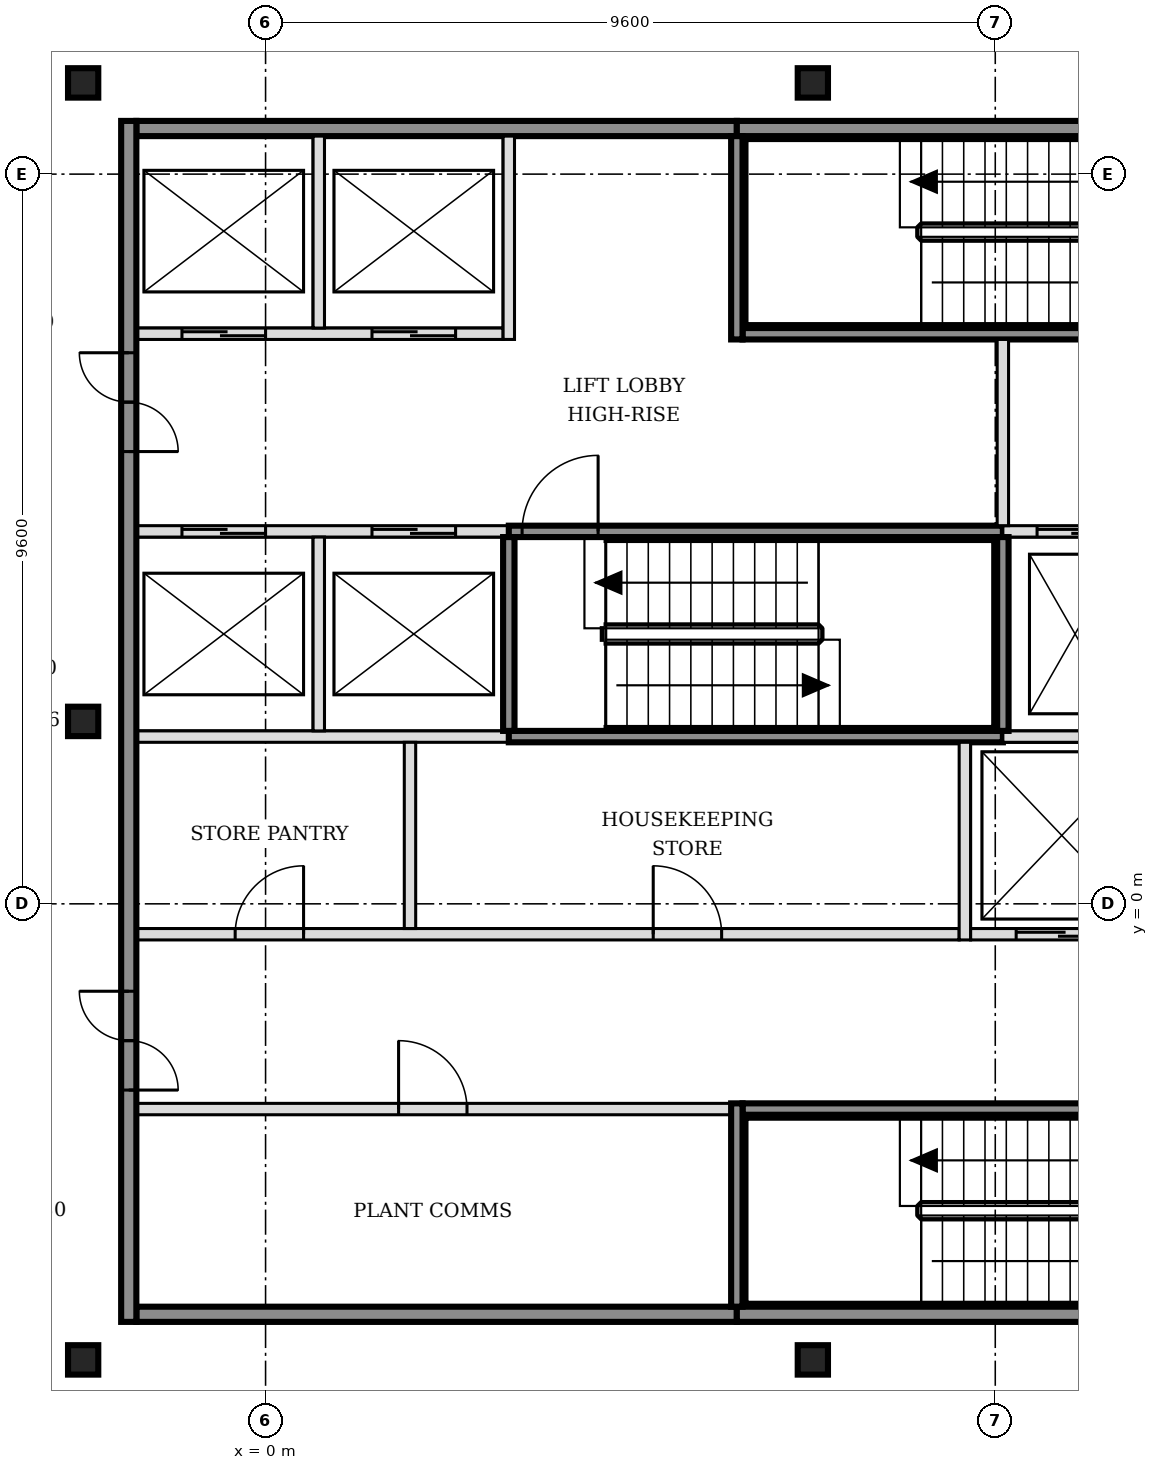
"""IFC4 building model, lengths in metres.
Left out: names, types, materials, properties, quantities, classifications, styles, units other than length and angle.
Written with IfcOpenShell. Run it as: python <this file> out.ifc"""

import sys

from ifc_helpers import new_model, si_unit, direction, frame, frame_2d, origin, origin_2d, place, context, subcontext, project, spatial, rectangle, i_section, extrude, element, fill, save


model = new_model("IFC4")
c1 = context("Model", 3, precision=1e-05, world=origin(), true_north=direction((0.0, 1.0)))
c2 = subcontext(c1, "Body", "Model", "MODEL_VIEW")
j1 = project(units=[si_unit("LENGTHUNIT", "METRE"), si_unit("PLANEANGLEUNIT", "RADIAN")], contexts=[c1])
p1 = place(None, origin())
s1 = spatial("IfcSite", under=j1, at=p1, CompositionType="ELEMENT")
p2 = place(p1, origin())
s2 = spatial("IfcBuilding", under=s1, at=p2, CompositionType="ELEMENT")
p3 = place(p2, frame((0.0, 0.0, 257.4)))
s3 = spatial("IfcBuildingStorey", under=s2, at=p3, CompositionType="ELEMENT", Elevation=257.4)
for number, where, z_axis, x_axis in (
    (1, (-2.4, -6.0, -0.15), (0.0, 0.0, 1.0), (1.0, 0.0, 0.0)),
    (2, (7.2, -6.0, -0.15), (0.0, 0.0, 1.0), (1.0, 0.0, 0.0)),
    (3, (-2.4, 2.4, -0.15), (0.0, 0.0, 1.0), (1.0, 0.0, 0.0)),
    (4, (-2.4, 10.8, -0.15), (0.0, 0.0, 1.0), (1.0, 0.0, 0.0)),
    (5, (7.2, 10.8, -0.15), (0.0, 0.0, 1.0), (1.0, 0.0, 0.0)),
):
    element("IfcColumn", number, at=place(p3, frame(where, z_axis=z_axis, x_axis=x_axis)), inside=s3, PredefinedType="COLUMN", context=c2, shape_type="SweptSolid", body=[
        extrude(i_section(OverallWidth=0.398, OverallDepth=0.387, WebThickness=0.021, FlangeThickness=0.033, FilletRadius=0.015, at=origin_2d()), origin(), (0.0, 0.0, 1.0), 3.5),
    ])
p4 = place(p3, frame((-1.7, -5.4, 0.0), z_axis=(0.0, 0.0, 1.0), x_axis=(1.0, 0.0, 0.0)))
e6 = element("IfcWall", 6, at=p4, inside=s3, PredefinedType="SOLIDWALL", context=c2, shape_type="SweptSolid", body=[
    extrude(rectangle(XDim=7.9, YDim=0.2, at=frame_2d((3.95, 0.0))), origin(), (0.0, 0.0, 1.0), 3.35),
])
p5 = place(p3, frame((6.2, -5.4, 0.0), z_axis=(0.0, 0.0, 1.0), x_axis=(1.0, 0.0, 0.0)))
e7 = element("IfcWall", 7, at=p5, inside=s3, PredefinedType="SOLIDWALL", context=c2, shape_type="SweptSolid", body=[
    extrude(rectangle(XDim=6.5, YDim=0.2, at=frame_2d((3.25, 0.0))), origin(), (0.0, 0.0, 1.0), 3.35),
])
p6 = place(p3, frame((-1.7, -2.7, 0.0), z_axis=(0.0, 0.0, 1.0), x_axis=(1.0, 0.0, 0.0)))
e8 = element("IfcWall", 8, at=p6, inside=s3, PredefinedType="PARTITIONING", context=c2, shape_type="SweptSolid", body=[
    extrude(rectangle(XDim=7.825, YDim=0.15, at=frame_2d((3.913, 0.0))), origin(), (0.0, 0.0, 1.0), 3.35),
])
p7 = place(p6, frame((3.45, 0.0, 0.0)))
e9 = element("IfcOpeningElement", 9, at=p7, cuts=e8, PredefinedType="OPENING", context=c2, shape_type="SweptSolid", body=[
    extrude(rectangle(XDim=0.9, YDim=2.1, at=frame_2d((0.45, 1.05))), frame((0.0, 0.085, 0.0), z_axis=(0.0, -1.0, 0.0), x_axis=(1.0, 0.0, 0.0)), (0.0, 0.0, 1.0), 0.17),
])
p8 = place(p3, frame((6.275, -2.7, 0.0), z_axis=(0.0, 0.0, 1.0), x_axis=(1.0, 0.0, 0.0)))
e10 = element("IfcWall", 10, at=p8, inside=s3, PredefinedType="SOLIDWALL", context=c2, shape_type="SweptSolid", body=[
    extrude(rectangle(XDim=6.35, YDim=0.15, at=frame_2d((3.175, 0.0))), origin(), (0.0, 0.0, 1.0), 3.35),
])
p9 = place(p8, frame((5.225, 0.0, 0.0)))
e11 = element("IfcOpeningElement", 11, at=p9, cuts=e10, PredefinedType="OPENING", context=c2, shape_type="SweptSolid", body=[
    extrude(rectangle(XDim=1.0, YDim=2.1, at=frame_2d((0.5, 1.05))), frame((0.0, 0.085, 0.0), z_axis=(0.0, -1.0, 0.0), x_axis=(1.0, 0.0, 0.0)), (0.0, 0.0, 1.0), 0.17),
])
p10 = place(p3, frame((-1.7, -0.4, 0.0), z_axis=(0.0, 0.0, 1.0), x_axis=(1.0, 0.0, 0.0)))
e12 = element("IfcWall", 12, at=p10, inside=s3, PredefinedType="PARTITIONING", context=c2, shape_type="SweptSolid", body=[
    extrude(rectangle(XDim=10.825, YDim=0.15, at=frame_2d((5.413, 0.0))), origin(), (0.0, 0.0, 1.0), 3.35),
])
p11 = place(p10, frame((1.3, 0.0, 0.0)))
e13 = element("IfcOpeningElement", 13, at=p11, cuts=e12, PredefinedType="OPENING", context=c2, shape_type="SweptSolid", body=[
    extrude(rectangle(XDim=0.9, YDim=2.1, at=frame_2d((0.45, 1.05))), frame((0.0, 0.085, 0.0), z_axis=(0.0, -1.0, 0.0), x_axis=(1.0, 0.0, 0.0)), (0.0, 0.0, 1.0), 0.17),
])
p12 = place(p10, frame((6.8, 0.0, 0.0)))
e14 = element("IfcOpeningElement", 14, at=p12, cuts=e12, PredefinedType="OPENING", context=c2, shape_type="SweptSolid", body=[
    extrude(rectangle(XDim=0.9, YDim=2.1, at=frame_2d((0.45, 1.05))), frame((0.0, 0.085, 0.0), z_axis=(0.0, -1.0, 0.0), x_axis=(1.0, 0.0, 0.0)), (0.0, 0.0, 1.0), 0.17),
])
p13 = place(p3, frame((9.275, -0.4, 0.0), z_axis=(0.0, 0.0, 1.0), x_axis=(1.0, 0.0, 0.0)))
e15 = element("IfcWall", 15, at=p13, inside=s3, PredefinedType="SOLIDWALL", context=c2, shape_type="SweptSolid", body=[
    extrude(rectangle(XDim=4.95, YDim=0.15, at=frame_2d((2.475, 0.0))), origin(), (0.0, 0.0, 1.0), 3.35),
])
p14 = place(p13, frame((0.6, 0.0, 0.0)))
e16 = element("IfcOpeningElement", 16, at=p14, cuts=e15, PredefinedType="OPENING", context=c2, shape_type="SweptSolid", body=[
    extrude(rectangle(XDim=1.2, YDim=2.1, at=frame_2d((0.6, 1.05))), frame((0.0, 0.085, 0.0), z_axis=(0.0, -1.0, 0.0), x_axis=(1.0, 0.0, 0.0)), (0.0, 0.0, 1.0), 0.17),
])
p15 = place(p13, frame((3.15, 0.0, 0.0)))
e17 = element("IfcOpeningElement", 17, at=p15, cuts=e15, PredefinedType="OPENING", context=c2, shape_type="SweptSolid", body=[
    extrude(rectangle(XDim=1.2, YDim=2.1, at=frame_2d((0.6, 1.05))), frame((0.0, 0.085, 0.0), z_axis=(0.0, -1.0, 0.0), x_axis=(1.0, 0.0, 0.0)), (0.0, 0.0, 1.0), 0.17),
])
p16 = place(p3, frame((-1.7, 2.2, 0.0), z_axis=(0.0, 0.0, 1.0), x_axis=(1.0, 0.0, 0.0)))
e18 = element("IfcWall", 18, at=p16, inside=s3, PredefinedType="SOLIDWALL", context=c2, shape_type="SweptSolid", body=[
    extrude(rectangle(XDim=4.9, YDim=0.15, at=frame_2d((2.45, 0.0))), origin(), (0.0, 0.0, 1.0), 3.35),
])
p17 = place(p3, frame((3.2, 2.2, 0.0), z_axis=(0.0, 0.0, 1.0), x_axis=(1.0, 0.0, 0.0)))
e19 = element("IfcWall", 19, at=p17, inside=s3, PredefinedType="SOLIDWALL", context=c2, shape_type="SweptSolid", body=[
    extrude(rectangle(XDim=6.5, YDim=0.15, at=frame_2d((3.25, 0.0))), origin(), (0.0, 0.0, 1.0), 3.35),
])
p18 = place(p3, frame((9.7, 2.2, 0.0), z_axis=(0.0, 0.0, 1.0), x_axis=(1.0, 0.0, 0.0)))
e20 = element("IfcWall", 20, at=p18, inside=s3, PredefinedType="SOLIDWALL", context=c2, shape_type="SweptSolid", body=[
    extrude(rectangle(XDim=4.525, YDim=0.15, at=frame_2d((2.263, 0.0))), origin(), (0.0, 0.0, 1.0), 3.35),
])
p19 = place(p3, frame((-1.7, 4.9, 0.0), z_axis=(0.0, 0.0, 1.0), x_axis=(1.0, 0.0, 0.0)))
e21 = element("IfcWall", 21, at=p19, inside=s3, PredefinedType="SOLIDWALL", context=c2, shape_type="SweptSolid", body=[
    extrude(rectangle(XDim=4.9, YDim=0.15, at=frame_2d((2.45, 0.0))), origin(), (0.0, 0.0, 1.0), 3.35),
])
p20 = place(p19, frame((0.6, 0.0, 0.0)))
e22 = element("IfcOpeningElement", 22, at=p20, cuts=e21, PredefinedType="OPENING", context=c2, shape_type="SweptSolid", body=[
    extrude(rectangle(XDim=1.1, YDim=2.1, at=frame_2d((0.55, 1.05))), frame((0.0, 0.085, 0.0), z_axis=(0.0, -1.0, 0.0), x_axis=(1.0, 0.0, 0.0)), (0.0, 0.0, 1.0), 0.17),
])
p21 = place(p19, frame((3.1, 0.0, 0.0)))
e23 = element("IfcOpeningElement", 23, at=p21, cuts=e21, PredefinedType="OPENING", context=c2, shape_type="SweptSolid", body=[
    extrude(rectangle(XDim=1.1, YDim=2.1, at=frame_2d((0.55, 1.05))), frame((0.0, 0.085, 0.0), z_axis=(0.0, -1.0, 0.0), x_axis=(1.0, 0.0, 0.0)), (0.0, 0.0, 1.0), 0.17),
])
p22 = place(p3, frame((3.2, 4.9, 0.0), z_axis=(0.0, 0.0, 1.0), x_axis=(1.0, 0.0, 0.0)))
e24 = element("IfcWall", 24, at=p22, inside=s3, PredefinedType="SOLIDWALL", context=c2, shape_type="SweptSolid", body=[
    extrude(rectangle(XDim=6.5, YDim=0.15, at=frame_2d((3.25, 0.0))), origin(), (0.0, 0.0, 1.0), 3.35),
])
p23 = place(p22, frame((0.175, 0.0, 0.0)))
e25 = element("IfcOpeningElement", 25, at=p23, cuts=e24, PredefinedType="OPENING", context=c2, shape_type="SweptSolid", body=[
    extrude(rectangle(XDim=1.0, YDim=2.1, at=frame_2d((0.5, 1.05))), frame((0.0, 0.085, 0.0), z_axis=(0.0, -1.0, 0.0), x_axis=(1.0, 0.0, 0.0)), (0.0, 0.0, 1.0), 0.17),
])
p24 = place(p3, frame((9.7, 4.9, 0.0), z_axis=(0.0, 0.0, 1.0), x_axis=(1.0, 0.0, 0.0)))
e26 = element("IfcWall", 26, at=p24, inside=s3, PredefinedType="SOLIDWALL", context=c2, shape_type="SweptSolid", body=[
    extrude(rectangle(XDim=6.4, YDim=0.15, at=frame_2d((3.2, 0.0))), origin(), (0.0, 0.0, 1.0), 3.35),
])
p25 = place(p24, frame((0.45, 0.0, 0.0)))
e27 = element("IfcOpeningElement", 27, at=p25, cuts=e26, PredefinedType="OPENING", context=c2, shape_type="SweptSolid", body=[
    extrude(rectangle(XDim=1.0, YDim=2.1, at=frame_2d((0.5, 1.05))), frame((0.0, 0.085, 0.0), z_axis=(0.0, -1.0, 0.0), x_axis=(1.0, 0.0, 0.0)), (0.0, 0.0, 1.0), 0.17),
])
p26 = place(p24, frame((2.35, 0.0, 0.0)))
e28 = element("IfcOpeningElement", 28, at=p26, cuts=e26, PredefinedType="OPENING", context=c2, shape_type="SweptSolid", body=[
    extrude(rectangle(XDim=1.0, YDim=2.1, at=frame_2d((0.5, 1.05))), frame((0.0, 0.085, 0.0), z_axis=(0.0, -1.0, 0.0), x_axis=(1.0, 0.0, 0.0)), (0.0, 0.0, 1.0), 0.17),
])
p27 = place(p24, frame((4.7, 0.0, 0.0)))
e29 = element("IfcOpeningElement", 29, at=p27, cuts=e26, PredefinedType="OPENING", context=c2, shape_type="SweptSolid", body=[
    extrude(rectangle(XDim=0.9, YDim=2.1, at=frame_2d((0.45, 1.05))), frame((0.0, 0.085, 0.0), z_axis=(0.0, -1.0, 0.0), x_axis=(1.0, 0.0, 0.0)), (0.0, 0.0, 1.0), 0.17),
])
p28 = place(p3, frame((-1.7, 7.5, 0.0), z_axis=(0.0, 0.0, 1.0), x_axis=(1.0, 0.0, 0.0)))
e30 = element("IfcWall", 30, at=p28, inside=s3, PredefinedType="SOLIDWALL", context=c2, shape_type="SweptSolid", body=[
    extrude(rectangle(XDim=4.825, YDim=0.15, at=frame_2d((2.413, 0.0))), origin(), (0.0, 0.0, 1.0), 3.35),
])
p29 = place(p28, frame((0.6, 0.0, 0.0)))
e31 = element("IfcOpeningElement", 31, at=p29, cuts=e30, PredefinedType="OPENING", context=c2, shape_type="SweptSolid", body=[
    extrude(rectangle(XDim=1.1, YDim=2.1, at=frame_2d((0.55, 1.05))), frame((0.0, 0.085, 0.0), z_axis=(0.0, -1.0, 0.0), x_axis=(1.0, 0.0, 0.0)), (0.0, 0.0, 1.0), 0.17),
])
p30 = place(p28, frame((3.1, 0.0, 0.0)))
e32 = element("IfcOpeningElement", 32, at=p30, cuts=e30, PredefinedType="OPENING", context=c2, shape_type="SweptSolid", body=[
    extrude(rectangle(XDim=1.1, YDim=2.1, at=frame_2d((0.55, 1.05))), frame((0.0, 0.085, 0.0), z_axis=(0.0, -1.0, 0.0), x_axis=(1.0, 0.0, 0.0)), (0.0, 0.0, 1.0), 0.17),
])
p31 = place(p3, frame((6.275, 7.5, 0.0), z_axis=(0.0, 0.0, 1.0), x_axis=(1.0, 0.0, 0.0)))
e33 = element("IfcWall", 33, at=p31, inside=s3, PredefinedType="SOLIDWALL", context=c2, shape_type="SweptSolid", body=[
    extrude(rectangle(XDim=6.425, YDim=0.15, at=frame_2d((3.212, 0.0))), origin(), (0.0, 0.0, 1.0), 3.35),
])
p32 = place(p31, frame((5.225, 0.0, 0.0)))
e34 = element("IfcOpeningElement", 34, at=p32, cuts=e33, PredefinedType="OPENING", context=c2, shape_type="SweptSolid", body=[
    extrude(rectangle(XDim=1.0, YDim=2.1, at=frame_2d((0.5, 1.05))), frame((0.0, 0.085, 0.0), z_axis=(0.0, -1.0, 0.0), x_axis=(1.0, 0.0, 0.0)), (0.0, 0.0, 1.0), 0.17),
])
p33 = place(p3, frame((-1.7, 10.2, 0.0), z_axis=(0.0, 0.0, 1.0), x_axis=(1.0, 0.0, 0.0)))
e35 = element("IfcWall", 35, at=p33, inside=s3, PredefinedType="SOLIDWALL", context=c2, shape_type="SweptSolid", body=[
    extrude(rectangle(XDim=7.9, YDim=0.2, at=frame_2d((3.95, 0.0))), origin(), (0.0, 0.0, 1.0), 3.35),
])
p34 = place(p3, frame((6.2, 10.2, 0.0), z_axis=(0.0, 0.0, 1.0), x_axis=(1.0, 0.0, 0.0)))
e36 = element("IfcWall", 36, at=p34, inside=s3, PredefinedType="SOLIDWALL", context=c2, shape_type="SweptSolid", body=[
    extrude(rectangle(XDim=6.5, YDim=0.2, at=frame_2d((3.25, 0.0))), origin(), (0.0, 0.0, 1.0), 3.35),
])
p35 = place(p3, frame((-1.8, -5.5, 0.0), z_axis=(0.0, 0.0, 1.0), x_axis=(0.0, 1.0, 0.0)))
e37 = element("IfcWall", 37, at=p35, inside=s3, PredefinedType="SOLIDWALL", context=c2, shape_type="SweptSolid", body=[
    extrude(rectangle(XDim=15.8, YDim=0.2, at=frame_2d((7.9, 0.0))), origin(), (0.0, 0.0, 1.0), 3.35),
])
p36 = place(p35, frame((3.05, 0.0, 0.0)))
e38 = element("IfcOpeningElement", 38, at=p36, cuts=e37, PredefinedType="OPENING", context=c2, shape_type="SweptSolid", body=[
    extrude(rectangle(XDim=1.3, YDim=2.1, at=frame_2d((0.65, 1.05))), frame((0.0, 0.11, 0.0), z_axis=(0.0, -1.0, 0.0), x_axis=(1.0, 0.0, 0.0)), (0.0, 0.0, 1.0), 0.22),
])
p37 = place(p35, frame((11.45, 0.0, 0.0)))
e39 = element("IfcOpeningElement", 39, at=p37, cuts=e37, PredefinedType="OPENING", context=c2, shape_type="SweptSolid", body=[
    extrude(rectangle(XDim=1.3, YDim=2.1, at=frame_2d((0.65, 1.05))), frame((0.0, 0.11, 0.0), z_axis=(0.0, -1.0, 0.0), x_axis=(1.0, 0.0, 0.0)), (0.0, 0.0, 1.0), 0.22),
])
p38 = place(p3, frame((0.7, 2.275, 0.0), z_axis=(0.0, 0.0, 1.0), x_axis=(0.0, 1.0, 0.0)))
e40 = element("IfcWall", 40, at=p38, inside=s3, PredefinedType="SOLIDWALL", context=c2, shape_type="SweptSolid", body=[
    extrude(rectangle(XDim=2.55, YDim=0.15, at=frame_2d((1.275, 0.0))), origin(), (0.0, 0.0, 1.0), 3.35),
])
p39 = place(p3, frame((0.7, 7.575, 0.0), z_axis=(0.0, 0.0, 1.0), x_axis=(0.0, 1.0, 0.0)))
e41 = element("IfcWall", 41, at=p39, inside=s3, PredefinedType="SOLIDWALL", context=c2, shape_type="SweptSolid", body=[
    extrude(rectangle(XDim=2.525, YDim=0.15, at=frame_2d((1.263, 0.0))), origin(), (0.0, 0.0, 1.0), 3.35),
])
p40 = place(p3, frame((1.9, -0.325, 0.0), z_axis=(0.0, 0.0, 1.0), x_axis=(0.0, 1.0, 0.0)))
e42 = element("IfcWall", 42, at=p40, inside=s3, PredefinedType="PARTITIONING", context=c2, shape_type="SweptSolid", body=[
    extrude(rectangle(XDim=2.45, YDim=0.15, at=frame_2d((1.225, 0.0))), origin(), (0.0, 0.0, 1.0), 3.35),
])
p41 = place(p3, frame((3.2, 2.275, 0.0), z_axis=(0.0, 0.0, 1.0), x_axis=(0.0, 1.0, 0.0)))
e43 = element("IfcWall", 43, at=p41, inside=s3, PredefinedType="SOLIDWALL", context=c2, shape_type="SweptSolid", body=[
    extrude(rectangle(XDim=2.55, YDim=0.15, at=frame_2d((1.275, 0.0))), origin(), (0.0, 0.0, 1.0), 3.35),
])
for number, where, z_axis, x_axis in (
    (44, (3.2, 7.425, 0.0), (0.0, 0.0, 1.0), (0.0, 1.0, 0.0)),
    (45, (6.2, -5.3, 0.0), (0.0, 0.0, 1.0), (0.0, 1.0, 0.0)),
    (46, (6.2, 7.425, 0.0), (0.0, 0.0, 1.0), (0.0, 1.0, 0.0)),
):
    element("IfcWall", number, at=place(p3, frame(where, z_axis=z_axis, x_axis=x_axis)), inside=s3, PredefinedType="SOLIDWALL", context=c2, shape_type="SweptSolid", body=[
        extrude(rectangle(XDim=2.675, YDim=0.15, at=frame_2d((1.337, 0.0))), origin(), (0.0, 0.0, 1.0), 3.35),
    ])
p42 = place(p3, frame((9.2, -0.475, 0.0), z_axis=(0.0, 0.0, 1.0), x_axis=(0.0, 1.0, 0.0)))
e47 = element("IfcWall", 47, at=p42, inside=s3, PredefinedType="SOLIDWALL", context=c2, shape_type="SweptSolid", body=[
    extrude(rectangle(XDim=2.6, YDim=0.15, at=frame_2d((1.3, 0.0))), origin(), (0.0, 0.0, 1.0), 3.35),
])
p43 = place(p3, frame((9.7, 2.275, 0.0), z_axis=(0.0, 0.0, 1.0), x_axis=(0.0, 1.0, 0.0)))
e48 = element("IfcWall", 48, at=p43, inside=s3, PredefinedType="SOLIDWALL", context=c2, shape_type="SweptSolid", body=[
    extrude(rectangle(XDim=2.55, YDim=0.15, at=frame_2d((1.275, 0.0))), origin(), (0.0, 0.0, 1.0), 3.35),
])
p44 = place(p3, frame((9.7, 4.975, 0.0), z_axis=(0.0, 0.0, 1.0), x_axis=(0.0, 1.0, 0.0)))
e49 = element("IfcWall", 49, at=p44, inside=s3, PredefinedType="SOLIDWALL", context=c2, shape_type="SweptSolid", body=[
    extrude(rectangle(XDim=2.45, YDim=0.15, at=frame_2d((1.225, 0.0))), origin(), (0.0, 0.0, 1.0), 3.35),
])
p45 = place(p14, origin())
e50 = element("IfcDoor", 50, at=p45, inside=s3, OperationType="DOUBLE_DOOR_SLIDING", PredefinedType="DOOR", context=c2, shape_type="SweptSolid", body=[
    extrude(rectangle(XDim=1.2, YDim=2.1, at=frame_2d((0.6, 1.05))), frame((0.0, 0.025, 0.0), z_axis=(0.0, -1.0, 0.0), x_axis=(1.0, 0.0, 0.0)), (0.0, 0.0, 1.0), 0.05),
])
fill(e16, e50)
p46 = place(p20, origin())
e51 = element("IfcDoor", 51, at=p46, inside=s3, OperationType="DOUBLE_DOOR_SLIDING", PredefinedType="DOOR", context=c2, shape_type="SweptSolid", body=[
    extrude(rectangle(XDim=1.1, YDim=2.1, at=frame_2d((0.55, 1.05))), frame((0.0, 0.025, 0.0), z_axis=(0.0, -1.0, 0.0), x_axis=(1.0, 0.0, 0.0)), (0.0, 0.0, 1.0), 0.05),
])
fill(e22, e51)
p47 = place(p21, origin())
e52 = element("IfcDoor", 52, at=p47, inside=s3, OperationType="DOUBLE_DOOR_SLIDING", PredefinedType="DOOR", context=c2, shape_type="SweptSolid", body=[
    extrude(rectangle(XDim=1.1, YDim=2.1, at=frame_2d((0.55, 1.05))), frame((0.0, 0.025, 0.0), z_axis=(0.0, -1.0, 0.0), x_axis=(1.0, 0.0, 0.0)), (0.0, 0.0, 1.0), 0.05),
])
fill(e23, e52)
p48 = place(p29, origin())
e53 = element("IfcDoor", 53, at=p48, inside=s3, OperationType="DOUBLE_DOOR_SLIDING", PredefinedType="DOOR", context=c2, shape_type="SweptSolid", body=[
    extrude(rectangle(XDim=1.1, YDim=2.1, at=frame_2d((0.55, 1.05))), frame((0.0, 0.025, 0.0), z_axis=(0.0, -1.0, 0.0), x_axis=(1.0, 0.0, 0.0)), (0.0, 0.0, 1.0), 0.05),
])
fill(e31, e53)
p49 = place(p30, origin())
e54 = element("IfcDoor", 54, at=p49, inside=s3, OperationType="DOUBLE_DOOR_SLIDING", PredefinedType="DOOR", context=c2, shape_type="SweptSolid", body=[
    extrude(rectangle(XDim=1.1, YDim=2.1, at=frame_2d((0.55, 1.05))), frame((0.0, 0.025, 0.0), z_axis=(0.0, -1.0, 0.0), x_axis=(1.0, 0.0, 0.0)), (0.0, 0.0, 1.0), 0.05),
])
fill(e32, e54)
p50 = place(p25, origin())
e55 = element("IfcDoor", 55, at=p50, inside=s3, OperationType="DOUBLE_DOOR_SLIDING", PredefinedType="DOOR", context=c2, shape_type="SweptSolid", body=[
    extrude(rectangle(XDim=1.0, YDim=2.1, at=frame_2d((0.5, 1.05))), frame((0.0, 0.025, 0.0), z_axis=(0.0, -1.0, 0.0), x_axis=(1.0, 0.0, 0.0)), (0.0, 0.0, 1.0), 0.05),
])
fill(e27, e55)
p51 = place(p23, origin())
e56 = element("IfcDoor", 56, at=p51, inside=s3, OperationType="SINGLE_SWING_RIGHT", PredefinedType="DOOR", context=c2, shape_type="SweptSolid", body=[
    extrude(rectangle(XDim=1.0, YDim=2.1, at=frame_2d((0.5, 1.05))), frame((0.0, 0.025, 0.0), z_axis=(0.0, -1.0, 0.0), x_axis=(1.0, 0.0, 0.0)), (0.0, 0.0, 1.0), 0.05),
])
fill(e25, e56)
p52 = place(p36, origin())
e57 = element("IfcDoor", 57, at=p52, inside=s3, OperationType="DOUBLE_DOOR_SINGLE_SWING", PredefinedType="DOOR", context=c2, shape_type="SweptSolid", body=[
    extrude(rectangle(XDim=1.3, YDim=2.1, at=frame_2d((0.65, 1.05))), frame((0.0, 0.025, 0.0), z_axis=(0.0, -1.0, 0.0), x_axis=(1.0, 0.0, 0.0)), (0.0, 0.0, 1.0), 0.05),
])
fill(e38, e57)
p53 = place(p37, origin())
e58 = element("IfcDoor", 58, at=p53, inside=s3, OperationType="DOUBLE_DOOR_SINGLE_SWING", PredefinedType="DOOR", context=c2, shape_type="SweptSolid", body=[
    extrude(rectangle(XDim=1.3, YDim=2.1, at=frame_2d((0.65, 1.05))), frame((0.0, 0.025, 0.0), z_axis=(0.0, -1.0, 0.0), x_axis=(1.0, 0.0, 0.0)), (0.0, 0.0, 1.0), 0.05),
])
fill(e39, e58)
p54 = place(p7, origin())
e59 = element("IfcDoor", 59, at=p54, inside=s3, OperationType="SINGLE_SWING_LEFT", PredefinedType="DOOR", context=c2, shape_type="SweptSolid", body=[
    extrude(rectangle(XDim=0.9, YDim=2.1, at=frame_2d((0.45, 1.05))), frame((0.0, 0.025, 0.0), z_axis=(0.0, -1.0, 0.0), x_axis=(1.0, 0.0, 0.0)), (0.0, 0.0, 1.0), 0.05),
])
fill(e9, e59)
p55 = place(p11, origin())
e60 = element("IfcDoor", 60, at=p55, inside=s3, OperationType="SINGLE_SWING_RIGHT", PredefinedType="DOOR", context=c2, shape_type="SweptSolid", body=[
    extrude(rectangle(XDim=0.9, YDim=2.1, at=frame_2d((0.45, 1.05))), frame((0.0, 0.025, 0.0), z_axis=(0.0, -1.0, 0.0), x_axis=(1.0, 0.0, 0.0)), (0.0, 0.0, 1.0), 0.05),
])
fill(e13, e60)
p56 = place(p12, origin())
e61 = element("IfcDoor", 61, at=p56, inside=s3, OperationType="SINGLE_SWING_LEFT", PredefinedType="DOOR", context=c2, shape_type="SweptSolid", body=[
    extrude(rectangle(XDim=0.9, YDim=2.1, at=frame_2d((0.45, 1.05))), frame((0.0, 0.025, 0.0), z_axis=(0.0, -1.0, 0.0), x_axis=(1.0, 0.0, 0.0)), (0.0, 0.0, 1.0), 0.05),
])
fill(e14, e61)
save(model, sys.argv[1])
